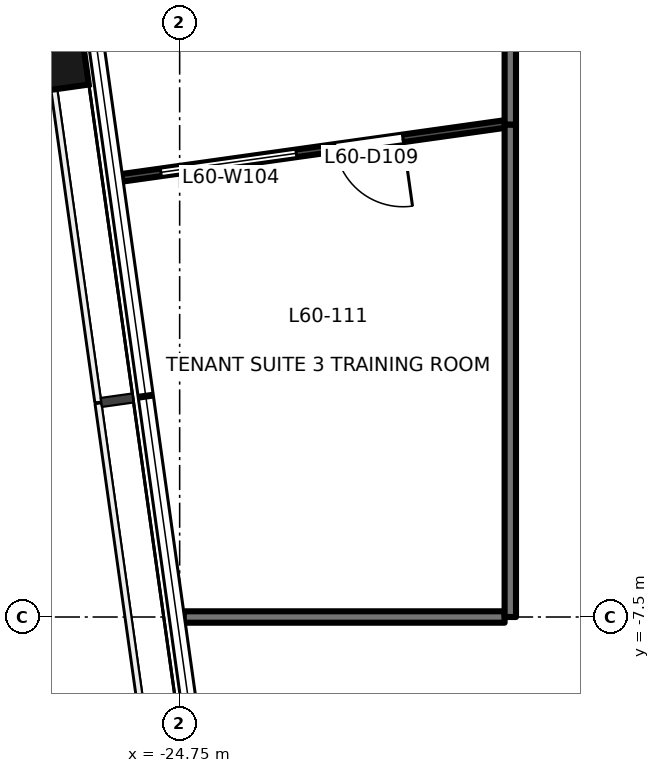
"""IFC4 building model, lengths in metres.
Left out: names, types, materials, properties, quantities, classifications, styles, units other than length and angle.
Written with IfcOpenShell. Run it as: python <this file> out.ifc"""

import sys

from ifc_helpers import new_model, si_unit, direction, frame, frame_2d, origin, origin_2d, place, context, subcontext, project, spatial, rectangle, extrude, element, fill, save


model = new_model("IFC4")
c1 = context("Model", 3, precision=1e-05, world=origin(), true_north=direction((0.0, 1.0)))
c2 = subcontext(c1, "Body", "Model", "MODEL_VIEW")
j1 = project(units=[si_unit("LENGTHUNIT", "METRE"), si_unit("PLANEANGLEUNIT", "RADIAN")], contexts=[c1])
p1 = place(None, origin())
s1 = spatial("IfcSite", under=j1, at=p1, CompositionType="ELEMENT")
p2 = place(p1, origin())
s2 = spatial("IfcBuilding", under=s1, at=p2, CompositionType="ELEMENT")
p3 = place(p2, frame((0.0, 0.0, 262.9)))
s3 = spatial("IfcBuildingStorey", under=s2, at=p3, CompositionType="ELEMENT", Elevation=262.9)
p4 = place(p3, frame((-26.906, -0.125, -0.2), z_axis=(0.0, 0.0, 1.0), x_axis=(-0.139190384377, 0.990265639562, 0.0)))
e1 = element("IfcColumn", 1, at=p4, inside=s3, PredefinedType="COLUMN", context=c2, shape_type="SweptSolid", body=[
    extrude(rectangle(XDim=1.0, YDim=1.8, at=origin_2d()), origin(), (0.0, 0.0, 1.0), 3.9),
])
p5 = place(p3, frame((-20.4, -1.024, 0.0), z_axis=(0.0, 0.0, 1.0), x_axis=(0.0, 1.0, 0.0)))
e2 = element("IfcWall", 2, at=p5, inside=s3, PredefinedType="PARTITIONING", context=c2, shape_type="SweptSolid", body=[
    extrude(rectangle(XDim=6.524, YDim=0.15, at=frame_2d((3.262, 0.0))), origin(), (0.0, 0.0, 1.0), 3.3),
])
p6 = place(p5, frame((1.531, 0.0, 0.0)))
e3 = element("IfcOpeningElement", 3, at=p6, cuts=e2, PredefinedType="OPENING", context=c2, shape_type="SweptSolid", body=[
    extrude(rectangle(XDim=0.9, YDim=2.1, at=frame_2d((0.45, 1.05))), frame((0.0, 0.085, 0.0), z_axis=(0.0, -1.0, 0.0), x_axis=(1.0, 0.0, 0.0)), (0.0, 0.0, 1.0), 0.171),
])
p7 = place(p3, frame((-24.696, -7.5, 0.0), z_axis=(0.0, 0.0, 1.0), x_axis=(1.0, 0.0, 0.0)))
e4 = element("IfcWall", 4, at=p7, inside=s3, PredefinedType="PARTITIONING", context=c2, shape_type="SweptSolid", body=[
    extrude(rectangle(XDim=4.221, YDim=0.15, at=frame_2d((2.11, 0.0))), origin(), (0.0, 0.0, 1.0), 3.7),
])
p8 = place(p3, frame((-20.4, -7.5, 0.0), z_axis=(0.0, 0.0, 1.0), x_axis=(0.0, 1.0, 0.0)))
e5 = element("IfcWall", 5, at=p8, inside=s3, PredefinedType="PARTITIONING", context=c2, shape_type="SweptSolid", body=[
    extrude(rectangle(XDim=6.476, YDim=0.15, at=frame_2d((3.238, 0.0))), origin(), (0.0, 0.0, 1.0), 3.3),
])
p9 = place(p3, frame((-20.468, -1.014, 0.0), z_axis=(0.0, 0.0, 1.0), x_axis=(-0.990280538481, -0.139084345292, 0.0)))
e6 = element("IfcWall", 6, at=p9, inside=s3, PredefinedType="PARTITIONING", context=c2, shape_type="SweptSolid", body=[
    extrude(rectangle(XDim=5.091, YDim=0.1, at=frame_2d((2.545, 0.0))), origin(), (0.0, 0.0, 1.0), 3.7),
])
p10 = place(p9, frame((1.357, 0.0, 0.0)))
e7 = element("IfcOpeningElement", 7, at=p10, cuts=e6, PredefinedType="OPENING", context=c2, shape_type="SweptSolid", body=[
    extrude(rectangle(XDim=0.9, YDim=2.1, at=frame_2d((0.45, 1.05))), frame((0.0, 0.061, 0.0), z_axis=(0.0, -1.0, 0.0), x_axis=(1.0, 0.0, 0.0)), (0.0, 0.0, 1.0), 0.121),
])
p11 = place(p9, frame((2.774, 0.0, 0.9)))
e8 = element("IfcOpeningElement", 8, at=p11, cuts=e6, PredefinedType="OPENING", context=c2, shape_type="SweptSolid", body=[
    extrude(rectangle(XDim=1.8, YDim=1.2, at=frame_2d((0.9, 0.6))), frame((0.0, 0.061, 0.0), z_axis=(0.0, -1.0, 0.0), x_axis=(1.0, 0.0, 0.0)), (0.0, 0.0, 1.0), 0.121),
])
p12 = place(p10, origin())
e9 = element("IfcDoor", 9, at=p12, inside=s3, OperationType="SINGLE_SWING_LEFT", PredefinedType="DOOR", context=c2, shape_type="SweptSolid", body=[
    extrude(rectangle(XDim=0.9, YDim=2.1, at=frame_2d((0.45, 1.05))), frame((0.0, 0.025, 0.0), z_axis=(0.0, -1.0, 0.0), x_axis=(1.0, 0.0, 0.0)), (0.0, 0.0, 1.0), 0.05),
])
fill(e7, e9)
p13 = place(p11, origin())
e10 = element("IfcWindow", 10, at=p13, inside=s3, PartitioningType="SINGLE_PANEL", PredefinedType="WINDOW", context=c2, shape_type="SweptSolid", body=[
    extrude(rectangle(XDim=1.8, YDim=1.2, at=frame_2d((0.9, 0.6))), frame((0.0, 0.03, 0.0), z_axis=(0.0, -1.0, 0.0), x_axis=(1.0, 0.0, 0.0)), (0.0, 0.0, 1.0), 0.06),
])
fill(e8, e10)
save(model, sys.argv[1])
